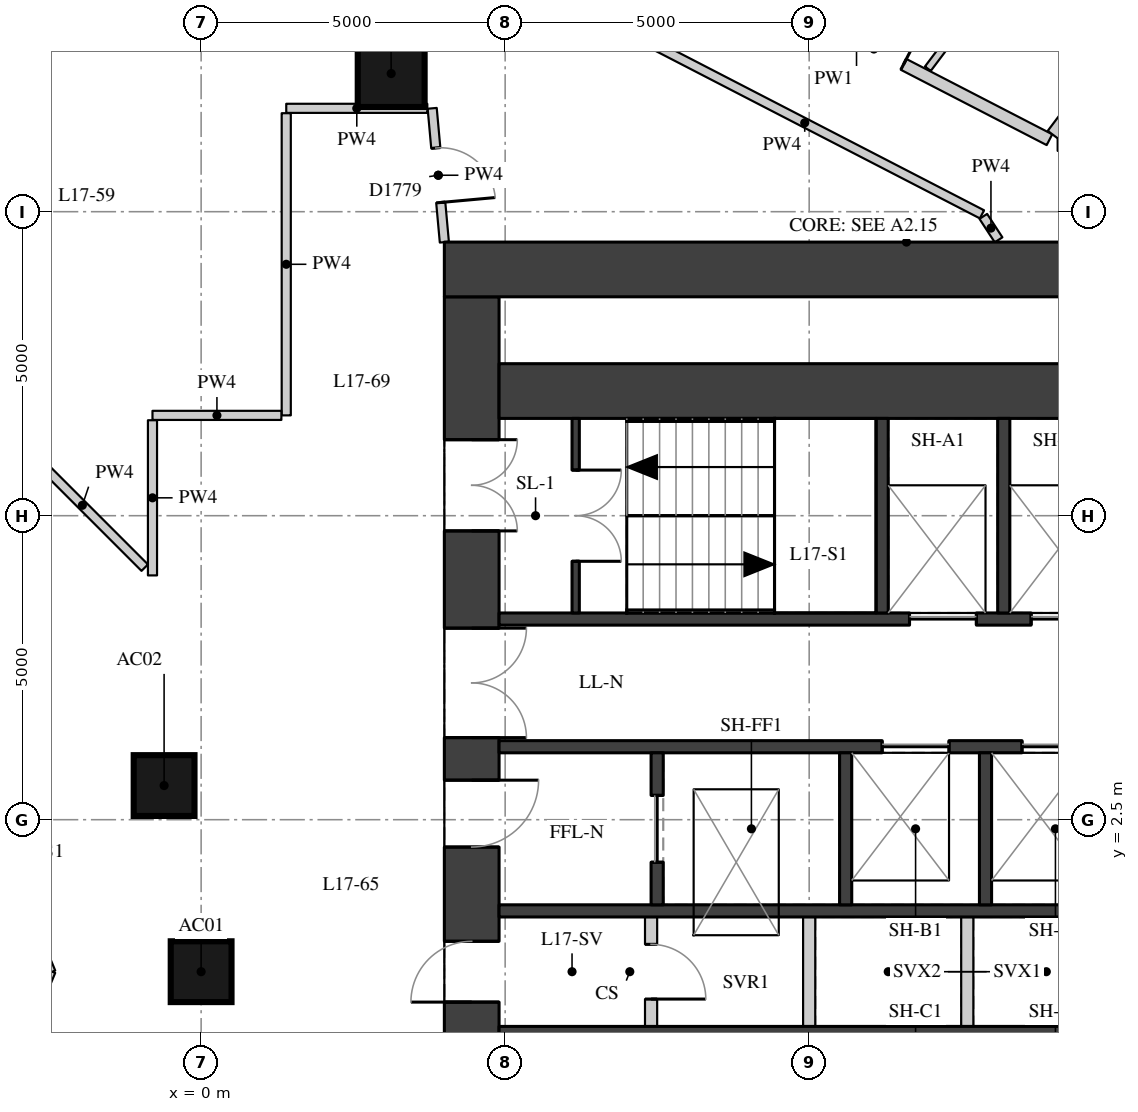
"""IFC4 building model, lengths in metres.
Left out: names, types, materials, properties, quantities, classifications, styles, units other than length and angle.
Written with IfcOpenShell. Run it as: python <this file> out.ifc"""

import sys

from ifc_helpers import new_model, si_unit, direction, frame, frame_2d, origin, origin_2d, place, context, subcontext, project, spatial, rectangle, extrude, element, fill, save


model = new_model("IFC4")
c1 = context("Model", 3, precision=1e-05, world=origin(), true_north=direction((0.0, 1.0)))
c2 = subcontext(c1, "Body", "Model", "MODEL_VIEW")
j1 = project(units=[si_unit("LENGTHUNIT", "METRE"), si_unit("PLANEANGLEUNIT", "RADIAN")], contexts=[c1])
p1 = place(None, origin())
s1 = spatial("IfcSite", under=j1, at=p1, CompositionType="ELEMENT")
p2 = place(p1, origin())
s2 = spatial("IfcBuilding", under=s1, at=p2, CompositionType="ELEMENT")
p3 = place(p2, frame((0.0, 0.0, 64.6)))
s3 = spatial("IfcBuildingStorey", under=s2, at=p3, CompositionType="ELEMENT", Elevation=64.6)
for number, where, z_axis, x_axis in (
    (1, (0.0, 0.0, 0.0), (0.0, 0.0, 1.0), (1.0, 0.0, 0.0)),
    (2, (-0.609, 3.062, 0.0), (0.0, 0.0, 1.0), (1.0, 0.0, 0.0)),
):
    element("IfcColumn", number, at=place(p3, frame(where, z_axis=z_axis, x_axis=x_axis)), inside=s3, PredefinedType="COLUMN", context=c2, shape_type="SweptSolid", body=[
        extrude(rectangle(XDim=1.0, YDim=1.0, at=origin_2d()), origin(), (0.0, 0.0, 1.0), 3.3),
    ])
p4 = place(p3, frame((3.126, 14.772, 0.0), z_axis=(0.0, 0.0, 1.0), x_axis=(1.0, 0.0, 0.0)))
e3 = element("IfcColumn", 3, at=p4, inside=s3, PredefinedType="COLUMN", context=c2, shape_type="SweptSolid", body=[
    extrude(rectangle(XDim=1.1, YDim=1.1, at=origin_2d()), origin(), (0.0, 0.0, 1.0), 3.3),
])
p5 = place(p3, frame((4.45, -11.1, 0.0), z_axis=(0.0, 0.0, 1.0), x_axis=(0.0, 1.0, 0.0)))
e4 = element("IfcWall", 4, at=p5, inside=s3, PredefinedType="SHEAR", context=c2, shape_type="SweptSolid", body=[
    extrude(rectangle(XDim=22.2, YDim=0.9, at=frame_2d((11.1, 0.0))), origin(), (0.0, 0.0, 1.0), 3.02),
])
p6 = place(p5, frame((2.35, 0.0, 0.0)))
e5 = element("IfcOpeningElement", 5, at=p6, cuts=e4, PredefinedType="OPENING", context=c2, shape_type="SweptSolid", body=[
    extrude(rectangle(XDim=1.5, YDim=2.1, at=frame_2d((0.75, 1.05))), frame((0.0, 0.46, 0.0), z_axis=(0.0, -1.0, 0.0), x_axis=(1.0, 0.0, 0.0)), (0.0, 0.0, 1.0), 0.92),
])
p7 = place(p5, frame((5.45, 0.0, 0.0)))
e6 = element("IfcOpeningElement", 6, at=p7, cuts=e4, PredefinedType="OPENING", context=c2, shape_type="SweptSolid", body=[
    extrude(rectangle(XDim=1.8, YDim=2.1, at=frame_2d((0.9, 1.05))), frame((0.0, 0.46, 0.0), z_axis=(0.0, -1.0, 0.0), x_axis=(1.0, 0.0, 0.0)), (0.0, 0.0, 1.0), 0.92),
])
p8 = place(p5, frame((7.95, 0.0, 0.0)))
e7 = element("IfcOpeningElement", 7, at=p8, cuts=e4, PredefinedType="OPENING", context=c2, shape_type="SweptSolid", body=[
    extrude(rectangle(XDim=1.1, YDim=2.1, at=frame_2d((0.55, 1.05))), frame((0.0, 0.46, 0.0), z_axis=(0.0, -1.0, 0.0), x_axis=(1.0, 0.0, 0.0)), (0.0, 0.0, 1.0), 0.92),
])
p9 = place(p5, frame((10.6, 0.0, 0.0)))
e8 = element("IfcOpeningElement", 8, at=p9, cuts=e4, PredefinedType="OPENING", context=c2, shape_type="SweptSolid", body=[
    extrude(rectangle(XDim=1.0, YDim=2.1, at=frame_2d((0.5, 1.05))), frame((0.0, 0.46, 0.0), z_axis=(0.0, -1.0, 0.0), x_axis=(1.0, 0.0, 0.0)), (0.0, 0.0, 1.0), 0.92),
])
p10 = place(p5, frame((13.15, 0.0, 0.0)))
e9 = element("IfcOpeningElement", 9, at=p10, cuts=e4, PredefinedType="OPENING", context=c2, shape_type="SweptSolid", body=[
    extrude(rectangle(XDim=1.1, YDim=2.1, at=frame_2d((0.55, 1.05))), frame((0.0, 0.46, 0.0), z_axis=(0.0, -1.0, 0.0), x_axis=(1.0, 0.0, 0.0)), (0.0, 0.0, 1.0), 0.92),
])
p11 = place(p5, frame((14.95, 0.0, 0.0)))
e10 = element("IfcOpeningElement", 10, at=p11, cuts=e4, PredefinedType="OPENING", context=c2, shape_type="SweptSolid", body=[
    extrude(rectangle(XDim=1.8, YDim=2.1, at=frame_2d((0.9, 1.05))), frame((0.0, 0.46, 0.0), z_axis=(0.0, -1.0, 0.0), x_axis=(1.0, 0.0, 0.0)), (0.0, 0.0, 1.0), 0.92),
])
p12 = place(p5, frame((18.35, 0.0, 0.0)))
e11 = element("IfcOpeningElement", 11, at=p12, cuts=e4, PredefinedType="OPENING", context=c2, shape_type="SweptSolid", body=[
    extrude(rectangle(XDim=1.5, YDim=2.1, at=frame_2d((0.75, 1.05))), frame((0.0, 0.46, 0.0), z_axis=(0.0, -1.0, 0.0), x_axis=(1.0, 0.0, 0.0)), (0.0, 0.0, 1.0), 0.92),
])
p13 = place(p3, frame((4.0, 11.55, 0.0), z_axis=(0.0, 0.0, 1.0), x_axis=(1.0, 0.0, 0.0)))
e12 = element("IfcWall", 12, at=p13, inside=s3, PredefinedType="SHEAR", context=c2, shape_type="SweptSolid", body=[
    extrude(rectangle(XDim=15.2, YDim=0.9, at=frame_2d((7.6, 0.0))), origin(), (0.0, 0.0, 1.0), 3.02),
])
p14 = place(p3, frame((4.9, 9.55, 0.0), z_axis=(0.0, 0.0, 1.0), x_axis=(1.0, 0.0, 0.0)))
e13 = element("IfcWall", 13, at=p14, inside=s3, PredefinedType="SHEAR", context=c2, shape_type="SweptSolid", body=[
    extrude(rectangle(XDim=10.2, YDim=0.9, at=frame_2d((5.1, 0.0))), origin(), (0.0, 0.0, 1.0), 3.02),
])
p15 = place(p3, frame((4.9, 5.8, 0.0), z_axis=(0.0, 0.0, 1.0), x_axis=(1.0, 0.0, 0.0)))
e14 = element("IfcWall", 14, at=p15, inside=s3, PredefinedType="SHEAR", context=c2, shape_type="SweptSolid", body=[
    extrude(rectangle(XDim=10.2, YDim=0.2, at=frame_2d((5.1, 0.0))), origin(), (0.0, 0.0, 1.0), 3.02),
])
p16 = place(p15, frame((6.75, 0.0, 0.0)))
e15 = element("IfcOpeningElement", 15, at=p16, cuts=e14, PredefinedType="OPENING", context=c2, shape_type="SweptSolid", body=[
    extrude(rectangle(XDim=1.1, YDim=2.1, at=frame_2d((0.55, 1.05))), frame((0.0, 0.11, 0.0), z_axis=(0.0, -1.0, 0.0), x_axis=(1.0, 0.0, 0.0)), (0.0, 0.0, 1.0), 0.22),
])
p17 = place(p15, frame((8.75, 0.0, 0.0)))
e16 = element("IfcOpeningElement", 16, at=p17, cuts=e14, PredefinedType="OPENING", context=c2, shape_type="SweptSolid", body=[
    extrude(rectangle(XDim=1.1, YDim=2.1, at=frame_2d((0.55, 1.05))), frame((0.0, 0.11, 0.0), z_axis=(0.0, -1.0, 0.0), x_axis=(1.0, 0.0, 0.0)), (0.0, 0.0, 1.0), 0.22),
])
p18 = place(p3, frame((4.9, 3.7, 0.0), z_axis=(0.0, 0.0, 1.0), x_axis=(1.0, 0.0, 0.0)))
e17 = element("IfcWall", 17, at=p18, inside=s3, PredefinedType="SHEAR", context=c2, shape_type="SweptSolid", body=[
    extrude(rectangle(XDim=10.2, YDim=0.2, at=frame_2d((5.1, 0.0))), origin(), (0.0, 0.0, 1.0), 3.02),
])
p19 = place(p18, frame((6.3, 0.0, 0.0)))
e18 = element("IfcOpeningElement", 18, at=p19, cuts=e17, PredefinedType="OPENING", context=c2, shape_type="SweptSolid", body=[
    extrude(rectangle(XDim=1.1, YDim=2.1, at=frame_2d((0.55, 1.05))), frame((0.0, 0.11, 0.0), z_axis=(0.0, -1.0, 0.0), x_axis=(1.0, 0.0, 0.0)), (0.0, 0.0, 1.0), 0.22),
])
p20 = place(p18, frame((8.6, 0.0, 0.0)))
e19 = element("IfcOpeningElement", 19, at=p20, cuts=e17, PredefinedType="OPENING", context=c2, shape_type="SweptSolid", body=[
    extrude(rectangle(XDim=1.1, YDim=2.1, at=frame_2d((0.55, 1.05))), frame((0.0, 0.11, 0.0), z_axis=(0.0, -1.0, 0.0), x_axis=(1.0, 0.0, 0.0)), (0.0, 0.0, 1.0), 0.22),
])
for number, where, z_axis, x_axis in (
    (20, (4.9, 1.0, 0.0), (0.0, 0.0, 1.0), (1.0, 0.0, 0.0)),
    (21, (4.9, -1.0, 0.0), (0.0, 0.0, 1.0), (1.0, 0.0, 0.0)),
):
    element("IfcWall", number, at=place(p3, frame(where, z_axis=z_axis, x_axis=x_axis)), inside=s3, PredefinedType="SHEAR", context=c2, shape_type="SweptSolid", body=[
        extrude(rectangle(XDim=10.2, YDim=0.2, at=frame_2d((5.1, 0.0))), origin(), (0.0, 0.0, 1.0), 3.02),
    ])
for number, where, z_axis, x_axis in (
    (22, (11.2, 5.9, 0.0), (0.0, 0.0, 1.0), (0.0, 1.0, 0.0)),
    (23, (13.2, 5.9, 0.0), (0.0, 0.0, 1.0), (0.0, 1.0, 0.0)),
):
    element("IfcWall", number, at=place(p3, frame(where, z_axis=z_axis, x_axis=x_axis)), inside=s3, PredefinedType="SHEAR", context=c2, shape_type="SweptSolid", body=[
        extrude(rectangle(XDim=3.2, YDim=0.2, at=frame_2d((1.6, 0.0))), origin(), (0.0, 0.0, 1.0), 3.02),
    ])
p21 = place(p3, frame((7.5, 1.1, 0.0), z_axis=(0.0, 0.0, 1.0), x_axis=(0.0, 1.0, 0.0)))
e24 = element("IfcWall", 24, at=p21, inside=s3, PredefinedType="SHEAR", context=c2, shape_type="SweptSolid", body=[
    extrude(rectangle(XDim=2.5, YDim=0.2, at=frame_2d((1.25, 0.0))), origin(), (0.0, 0.0, 1.0), 3.02),
])
p22 = place(p21, frame((0.7, 0.0, 0.0)))
e25 = element("IfcOpeningElement", 25, at=p22, cuts=e24, PredefinedType="OPENING", context=c2, shape_type="SweptSolid", body=[
    extrude(rectangle(XDim=1.1, YDim=2.1, at=frame_2d((0.55, 1.05))), frame((0.0, 0.11, 0.0), z_axis=(0.0, -1.0, 0.0), x_axis=(1.0, 0.0, 0.0)), (0.0, 0.0, 1.0), 0.22),
])
for number, where, z_axis, x_axis in (
    (26, (10.6, 1.1, 0.0), (0.0, 0.0, 1.0), (0.0, 1.0, 0.0)),
    (27, (12.9, 1.1, 0.0), (0.0, 0.0, 1.0), (0.0, 1.0, 0.0)),
):
    element("IfcWall", number, at=place(p3, frame(where, z_axis=z_axis, x_axis=x_axis)), inside=s3, PredefinedType="SHEAR", context=c2, shape_type="SweptSolid", body=[
        extrude(rectangle(XDim=2.5, YDim=0.2, at=frame_2d((1.25, 0.0))), origin(), (0.0, 0.0, 1.0), 3.02),
    ])
p23 = place(p3, frame((6.16, 5.9, 0.0), z_axis=(0.0, 0.0, 1.0), x_axis=(0.0, 1.0, 0.0)))
e28 = element("IfcWall", 28, at=p23, inside=s3, PredefinedType="SHEAR", context=c2, shape_type="SweptSolid", body=[
    extrude(rectangle(XDim=3.2, YDim=0.12, at=frame_2d((1.6, 0.0))), origin(), (0.0, 0.0, 1.0), 3.02),
])
p24 = place(p23, frame((0.85, 0.0, 0.0)))
e29 = element("IfcOpeningElement", 29, at=p24, cuts=e28, PredefinedType="OPENING", context=c2, shape_type="SweptSolid", body=[
    extrude(rectangle(XDim=1.5, YDim=2.1, at=frame_2d((0.75, 1.05))), frame((0.0, 0.07, 0.0), z_axis=(0.0, -1.0, 0.0), x_axis=(1.0, 0.0, 0.0)), (0.0, 0.0, 1.0), 0.14),
])
p25 = place(p3, frame((7.4, -0.9, 0.0), z_axis=(0.0, 0.0, 1.0), x_axis=(0.0, 1.0, 0.0)))
e30 = element("IfcWall", 30, at=p25, inside=s3, PredefinedType="PARTITIONING", context=c2, shape_type="SweptSolid", body=[
    extrude(rectangle(XDim=1.8, YDim=0.2, at=frame_2d((0.9, 0.0))), origin(), (0.0, 0.0, 1.0), 3.02),
])
p26 = place(p25, frame((0.45, 0.0, 0.0)))
e31 = element("IfcOpeningElement", 31, at=p26, cuts=e30, PredefinedType="OPENING", context=c2, shape_type="SweptSolid", body=[
    extrude(rectangle(XDim=0.9, YDim=2.1, at=frame_2d((0.45, 1.05))), frame((0.0, 0.11, 0.0), z_axis=(0.0, -1.0, 0.0), x_axis=(1.0, 0.0, 0.0)), (0.0, 0.0, 1.0), 0.22),
])
for number, where, z_axis, x_axis in (
    (32, (10.0, -0.9, 0.0), (0.0, 0.0, 1.0), (0.0, 1.0, 0.0)),
    (33, (12.6, -0.9, 0.0), (0.0, 0.0, 1.0), (0.0, 1.0, 0.0)),
):
    element("IfcWall", number, at=place(p3, frame(where, z_axis=z_axis, x_axis=x_axis)), inside=s3, PredefinedType="PARTITIONING", context=c2, shape_type="SweptSolid", body=[
        extrude(rectangle(XDim=1.8, YDim=0.2, at=frame_2d((0.9, 0.0))), origin(), (0.0, 0.0, 1.0), 3.02),
    ])
p27 = place(p3, frame((7.606, 16.961, 0.0), z_axis=(0.0, 0.0, 1.0), x_axis=(0.888519518851, -0.45883882205, 0.0)))
e34 = element("IfcWall", 34, at=p27, inside=s3, PredefinedType="PARTITIONING", context=c2, shape_type="SweptSolid", body=[
    extrude(rectangle(XDim=7.142, YDim=0.2, at=frame_2d((3.571, 0.0))), origin(), (0.0, 0.0, 1.0), 3.02),
])
p28 = place(p27, frame((3.342, 0.0, 0.0)))
e35 = element("IfcOpeningElement", 35, at=p28, cuts=e34, PredefinedType="OPENING", context=c2, shape_type="SweptSolid", body=[
    extrude(rectangle(XDim=1.1, YDim=2.1, at=frame_2d((0.55, 1.05))), frame((0.0, 0.11, 0.0), z_axis=(0.0, -1.0, 0.0), x_axis=(1.0, 0.0, 0.0)), (0.0, 0.0, 1.0), 0.22),
])
p29 = place(p3, frame((14.086, 13.6, 0.0), z_axis=(0.0, 0.0, 1.0), x_axis=(1.0, 0.0, 0.0)))
e36 = element("IfcWall", 36, at=p29, inside=s3, PredefinedType="PARTITIONING", context=c2, shape_type="SweptSolid", body=[
    extrude(rectangle(XDim=6.614, YDim=0.2, at=frame_2d((3.307, 0.0))), origin(), (0.0, 0.0, 1.0), 3.02),
])
p30 = place(p29, frame((2.303, 0.0, 0.0)))
e37 = element("IfcOpeningElement", 37, at=p30, cuts=e36, PredefinedType="OPENING", context=c2, shape_type="SweptSolid", body=[
    extrude(rectangle(XDim=1.8, YDim=2.1, at=frame_2d((0.9, 1.05))), frame((0.0, 0.11, 0.0), z_axis=(0.0, -1.0, 0.0), x_axis=(1.0, 0.0, 0.0)), (0.0, 0.0, 1.0), 0.22),
])
p31 = place(p3, frame((4.0, 11.999, 0.0), z_axis=(0.0, 0.0, 1.0), x_axis=(-0.090475982725, 0.995898637689, 0.0)))
e38 = element("IfcWall", 38, at=p31, inside=s3, PredefinedType="PARTITIONING", context=c2, shape_type="SweptSolid", body=[
    extrude(rectangle(XDim=2.21, YDim=0.15, at=frame_2d((1.105, 0.0))), origin(), (0.0, 0.0, 1.0), 3.02),
])
p32 = place(p31, frame((0.655, 0.0, 0.0)))
e39 = element("IfcOpeningElement", 39, at=p32, cuts=e38, PredefinedType="OPENING", context=c2, shape_type="SweptSolid", body=[
    extrude(rectangle(XDim=0.9, YDim=2.1, at=frame_2d((0.45, 1.05))), frame((0.0, 0.085, 0.0), z_axis=(0.0, -1.0, 0.0), x_axis=(1.0, 0.0, 0.0)), (0.0, 0.0, 1.0), 0.17),
])
p33 = place(p3, frame((3.72, 14.2, 0.0), z_axis=(0.0, 0.0, 1.0), x_axis=(-1.0, 0.0, 0.0)))
e40 = element("IfcWall", 40, at=p33, inside=s3, PredefinedType="PARTITIONING", context=c2, shape_type="SweptSolid", body=[
    extrude(rectangle(XDim=2.32, YDim=0.15, at=frame_2d((1.16, 0.0))), origin(), (0.0, 0.0, 1.0), 3.02),
])
p34 = place(p3, frame((1.4, 14.12, 0.0), z_axis=(0.0, 0.0, 1.0), x_axis=(0.0, -1.0, 0.0)))
e41 = element("IfcWall", 41, at=p34, inside=s3, PredefinedType="PARTITIONING", context=c2, shape_type="SweptSolid", body=[
    extrude(rectangle(XDim=4.97, YDim=0.15, at=frame_2d((2.485, 0.0))), origin(), (0.0, 0.0, 1.0), 3.02),
])
p35 = place(p3, frame((1.32, 9.15, 0.0), z_axis=(0.0, 0.0, 1.0), x_axis=(-1.0, 0.0, 0.0)))
e42 = element("IfcWall", 42, at=p35, inside=s3, PredefinedType="PARTITIONING", context=c2, shape_type="SweptSolid", body=[
    extrude(rectangle(XDim=2.12, YDim=0.15, at=frame_2d((1.06, 0.0))), origin(), (0.0, 0.0, 1.0), 3.02),
])
p36 = place(p3, frame((-0.8, 9.07, 0.0), z_axis=(0.0, 0.0, 1.0), x_axis=(0.0, -1.0, 0.0)))
e43 = element("IfcWall", 43, at=p36, inside=s3, PredefinedType="PARTITIONING", context=c2, shape_type="SweptSolid", body=[
    extrude(rectangle(XDim=2.552, YDim=0.15, at=frame_2d((1.276, 0.0))), origin(), (0.0, 0.0, 1.0), 3.02),
])
p37 = place(p3, frame((-0.927, 6.645, 0.0), z_axis=(0.0, 0.0, 1.0), x_axis=(-0.707106781187, 0.707106781187, 0.0)))
e44 = element("IfcWall", 44, at=p37, inside=s3, PredefinedType="PARTITIONING", context=c2, shape_type="SweptSolid", body=[
    extrude(rectangle(XDim=2.901, YDim=0.15, at=frame_2d((1.451, 0.0))), origin(), (0.0, 0.0, 1.0), 3.02),
])
p38 = place(p3, frame((-7.022, 14.875, 0.0), z_axis=(0.0, 0.0, 1.0), x_axis=(0.972565872543, 0.232627650043, 0.0)))
e45 = element("IfcWall", 45, at=p38, inside=s3, PredefinedType="PARTITIONING", context=c2, shape_type="SweptSolid", body=[
    extrude(rectangle(XDim=7.286, YDim=0.15, at=frame_2d((3.643, 0.0))), origin(), (0.0, 0.0, 1.0), 3.02),
])
p39 = place(p3, frame((7.012, 15.467, 0.0), z_axis=(0.0, 0.0, 1.0), x_axis=(0.888509096081, -0.458859004685, 0.0)))
e46 = element("IfcWall", 46, at=p39, inside=s3, PredefinedType="PARTITIONING", context=c2, shape_type="SweptSolid", body=[
    extrude(rectangle(XDim=6.561, YDim=0.15, at=frame_2d((3.281, 0.0))), origin(), (0.0, 0.0, 1.0), 3.02),
])
p40 = place(p3, frame((12.864, 12.423, 0.0), z_axis=(0.0, 0.0, 1.0), x_axis=(0.545733799108, -0.837958603101, 0.0)))
e47 = element("IfcWall", 47, at=p40, inside=s3, PredefinedType="PARTITIONING", context=c2, shape_type="SweptSolid", body=[
    extrude(rectangle(XDim=0.46, YDim=0.15, at=frame_2d((0.23, 0.0))), origin(), (0.0, 0.0, 1.0), 3.02),
])
p41 = place(p3, frame((16.927, 17.638, 0.0), z_axis=(0.0, 0.0, 1.0), x_axis=(-0.601159395391, -0.799129139334, 0.0)))
e48 = element("IfcWall", 48, at=p41, inside=s3, PredefinedType="PARTITIONING", context=c2, shape_type="SweptSolid", body=[
    extrude(rectangle(XDim=4.849, YDim=0.22, at=frame_2d((2.425, 0.0))), origin(), (0.0, 0.0, 1.0), 3.02),
])
p42 = place(p3, frame((11.952, 14.852, 0.0), z_axis=(0.0, 0.0, 1.0), x_axis=(0.60115003842, 0.7991361782, 0.0)))
e49 = element("IfcWall", 49, at=p42, inside=s3, PredefinedType="PARTITIONING", context=c2, shape_type="SweptSolid", body=[
    extrude(rectangle(XDim=2.818, YDim=0.12, at=frame_2d((1.409, 0.0))), origin(), (0.0, 0.0, 1.0), 3.02),
])
for number, where, z_axis, x_axis in (
    (50, (-2.446, 0.0, 0.0), (0.0, 0.0, 1.0), (-0.383, -0.924, 0.0)),
    (51, (-4.073, 3.927, 0.0), (0.0, 0.0, 1.0), (0.383, -0.924, 0.0)),
):
    element("IfcWall", number, at=place(p3, frame(where, z_axis=z_axis, x_axis=x_axis)), inside=s3, PredefinedType="PARTITIONING", context=c2, shape_type="SweptSolid", body=[
        extrude(rectangle(XDim=4.251, YDim=0.1, at=frame_2d((2.125, 0.0))), origin(), (0.0, 0.0, 1.0), 3.02),
    ])
p43 = place(p9, origin())
e52 = element("IfcDoor", 52, at=p43, inside=s3, OperationType="SINGLE_SWING_LEFT", PredefinedType="DOOR", context=c2, shape_type="SweptSolid", body=[
    extrude(rectangle(XDim=1.0, YDim=2.1, at=frame_2d((0.5, 1.05))), frame((0.0, 0.025, 0.0), z_axis=(0.0, -1.0, 0.0), x_axis=(1.0, 0.0, 0.0)), (0.0, 0.0, 1.0), 0.05),
])
fill(e8, e52)
p44 = place(p10, origin())
e53 = element("IfcDoor", 53, at=p44, inside=s3, OperationType="SINGLE_SWING_LEFT", PredefinedType="DOOR", context=c2, shape_type="SweptSolid", body=[
    extrude(rectangle(XDim=1.1, YDim=2.1, at=frame_2d((0.55, 1.05))), frame((0.0, 0.025, 0.0), z_axis=(0.0, -1.0, 0.0), x_axis=(1.0, 0.0, 0.0)), (0.0, 0.0, 1.0), 0.05),
])
fill(e9, e53)
p45 = place(p11, origin())
e54 = element("IfcDoor", 54, at=p45, inside=s3, OperationType="DOUBLE_DOOR_SINGLE_SWING", PredefinedType="DOOR", context=c2, shape_type="SweptSolid", body=[
    extrude(rectangle(XDim=1.8, YDim=2.1, at=frame_2d((0.9, 1.05))), frame((0.0, 0.025, 0.0), z_axis=(0.0, -1.0, 0.0), x_axis=(1.0, 0.0, 0.0)), (0.0, 0.0, 1.0), 0.05),
])
fill(e10, e54)
p46 = place(p12, origin())
e55 = element("IfcDoor", 55, at=p46, inside=s3, OperationType="DOUBLE_DOOR_SINGLE_SWING", PredefinedType="DOOR", context=c2, shape_type="SweptSolid", body=[
    extrude(rectangle(XDim=1.5, YDim=2.1, at=frame_2d((0.75, 1.05))), frame((0.0, 0.025, 0.0), z_axis=(0.0, -1.0, 0.0), x_axis=(1.0, 0.0, 0.0)), (0.0, 0.0, 1.0), 0.05),
])
fill(e11, e55)
p47 = place(p24, origin())
e56 = element("IfcDoor", 56, at=p47, inside=s3, OperationType="DOUBLE_DOOR_SINGLE_SWING", PredefinedType="DOOR", context=c2, shape_type="SweptSolid", body=[
    extrude(rectangle(XDim=1.5, YDim=2.1, at=frame_2d((0.75, 1.05))), frame((0.0, 0.025, 0.0), z_axis=(0.0, -1.0, 0.0), x_axis=(1.0, 0.0, 0.0)), (0.0, 0.0, 1.0), 0.05),
])
fill(e29, e56)
p48 = place(p16, origin())
e57 = element("IfcDoor", 57, at=p48, inside=s3, OperationType="DOUBLE_DOOR_SLIDING", PredefinedType="DOOR", context=c2, shape_type="SweptSolid", body=[
    extrude(rectangle(XDim=1.1, YDim=2.1, at=frame_2d((0.55, 1.05))), frame((0.0, 0.025, 0.0), z_axis=(0.0, -1.0, 0.0), x_axis=(1.0, 0.0, 0.0)), (0.0, 0.0, 1.0), 0.05),
])
fill(e15, e57)
p49 = place(p17, origin())
e58 = element("IfcDoor", 58, at=p49, inside=s3, OperationType="DOUBLE_DOOR_SLIDING", PredefinedType="DOOR", context=c2, shape_type="SweptSolid", body=[
    extrude(rectangle(XDim=1.1, YDim=2.1, at=frame_2d((0.55, 1.05))), frame((0.0, 0.025, 0.0), z_axis=(0.0, -1.0, 0.0), x_axis=(1.0, 0.0, 0.0)), (0.0, 0.0, 1.0), 0.05),
])
fill(e16, e58)
p50 = place(p19, origin())
e59 = element("IfcDoor", 59, at=p50, inside=s3, OperationType="DOUBLE_DOOR_SLIDING", PredefinedType="DOOR", context=c2, shape_type="SweptSolid", body=[
    extrude(rectangle(XDim=1.1, YDim=2.1, at=frame_2d((0.55, 1.05))), frame((0.0, 0.025, 0.0), z_axis=(0.0, -1.0, 0.0), x_axis=(1.0, 0.0, 0.0)), (0.0, 0.0, 1.0), 0.05),
])
fill(e18, e59)
p51 = place(p20, origin())
e60 = element("IfcDoor", 60, at=p51, inside=s3, OperationType="DOUBLE_DOOR_SLIDING", PredefinedType="DOOR", context=c2, shape_type="SweptSolid", body=[
    extrude(rectangle(XDim=1.1, YDim=2.1, at=frame_2d((0.55, 1.05))), frame((0.0, 0.025, 0.0), z_axis=(0.0, -1.0, 0.0), x_axis=(1.0, 0.0, 0.0)), (0.0, 0.0, 1.0), 0.05),
])
fill(e19, e60)
p52 = place(p22, origin())
e61 = element("IfcDoor", 61, at=p52, inside=s3, OperationType="DOUBLE_DOOR_SLIDING", PredefinedType="DOOR", context=c2, shape_type="SweptSolid", body=[
    extrude(rectangle(XDim=1.1, YDim=2.1, at=frame_2d((0.55, 1.05))), frame((0.0, 0.025, 0.0), z_axis=(0.0, -1.0, 0.0), x_axis=(1.0, 0.0, 0.0)), (0.0, 0.0, 1.0), 0.05),
])
fill(e25, e61)
p53 = place(p26, origin())
e62 = element("IfcDoor", 62, at=p53, inside=s3, OperationType="SINGLE_SWING_RIGHT", PredefinedType="DOOR", context=c2, shape_type="SweptSolid", body=[
    extrude(rectangle(XDim=0.9, YDim=2.1, at=frame_2d((0.45, 1.05))), frame((0.0, 0.025, 0.0), z_axis=(0.0, -1.0, 0.0), x_axis=(1.0, 0.0, 0.0)), (0.0, 0.0, 1.0), 0.05),
])
fill(e31, e62)
p54 = place(p28, origin())
e63 = element("IfcDoor", 63, at=p54, inside=s3, OperationType="SINGLE_SWING_RIGHT", PredefinedType="DOOR", context=c2, shape_type="SweptSolid", body=[
    extrude(rectangle(XDim=1.1, YDim=2.1, at=frame_2d((0.55, 1.05))), frame((0.0, 0.025, 0.0), z_axis=(0.0, -1.0, 0.0), x_axis=(1.0, 0.0, 0.0)), (0.0, 0.0, 1.0), 0.05),
])
fill(e35, e63)
p55 = place(p32, origin())
e64 = element("IfcDoor", 64, at=p55, inside=s3, OperationType="SINGLE_SWING_RIGHT", PredefinedType="DOOR", context=c2, shape_type="SweptSolid", body=[
    extrude(rectangle(XDim=0.9, YDim=2.1, at=frame_2d((0.45, 1.05))), frame((0.0, 0.025, 0.0), z_axis=(0.0, -1.0, 0.0), x_axis=(1.0, 0.0, 0.0)), (0.0, 0.0, 1.0), 0.05),
])
fill(e39, e64)
save(model, sys.argv[1])
